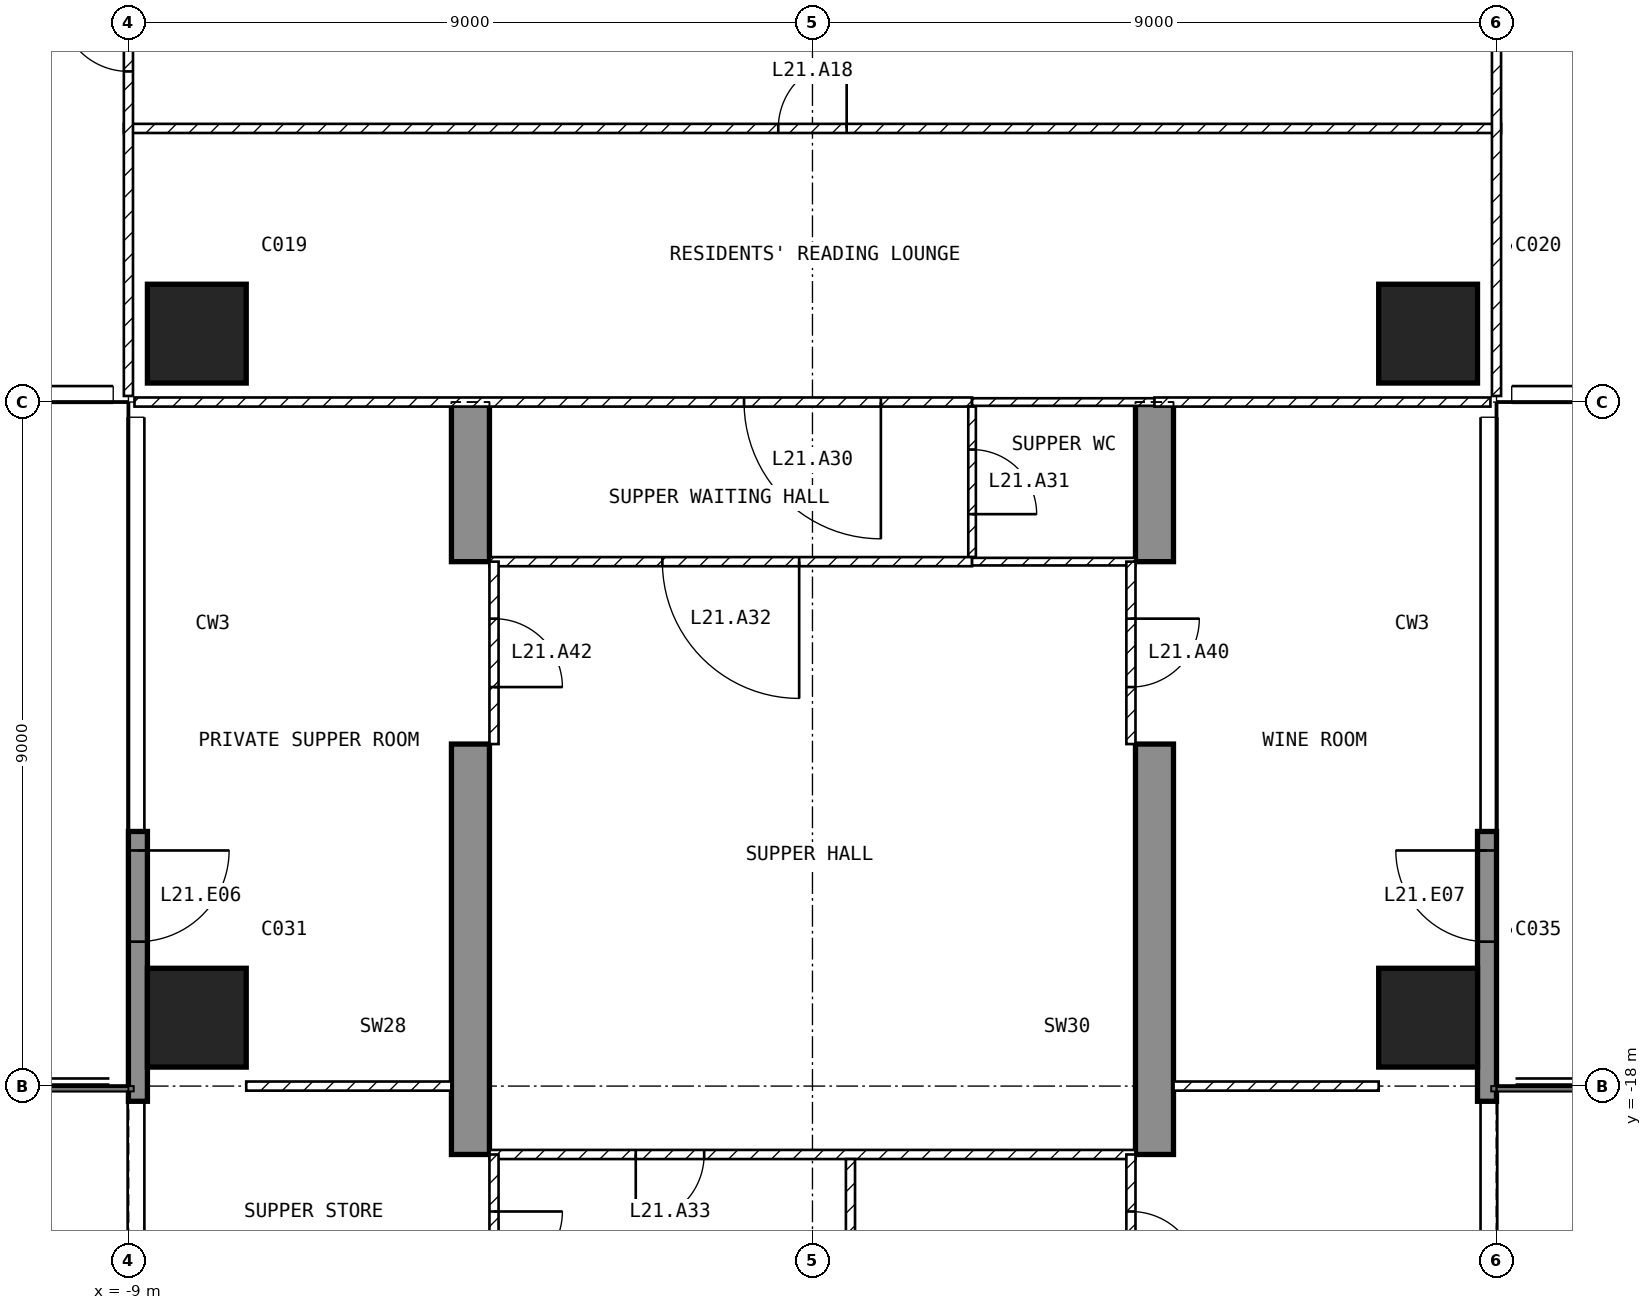
"""IFC4 building model, lengths in metres.
Left out: names, types, materials, properties, quantities, classifications, styles, units other than length and angle.
Written with IfcOpenShell. Run it as: python <this file> out.ifc"""

import sys

from ifc_helpers import new_model, si_unit, direction, frame, frame_2d, origin, origin_2d, place, context, subcontext, project, spatial, polyline, rectangle, outline, extrude, element, fill, save


model = new_model("IFC4")
c1 = context("Model", 3, precision=1e-05, world=origin(), true_north=direction((0.0, 1.0)))
c2 = subcontext(c1, "Body", "Model", "MODEL_VIEW")
j1 = project(units=[si_unit("LENGTHUNIT", "METRE"), si_unit("PLANEANGLEUNIT", "RADIAN")], contexts=[c1])
p1 = place(None, origin())
s1 = spatial("IfcSite", under=j1, at=p1, CompositionType="ELEMENT")
p2 = place(p1, origin())
s2 = spatial("IfcBuilding", under=s1, at=p2, CompositionType="ELEMENT")
p3 = place(p2, frame((0.0, 0.0, 92.5)))
s3 = spatial("IfcBuildingStorey", under=s2, at=p3, CompositionType="ELEMENT", Elevation=92.5)
for number, where, z_axis, x_axis in (
    (1, (-8.1, -17.1, -0.3), (0.0, 0.0, 1.0), (1.0, 0.0, 0.0)),
    (2, (-8.1, -8.1, -0.3), (0.0, 0.0, 1.0), (1.0, 0.0, 0.0)),
    (3, (8.1, -17.1, -0.3), (0.0, 0.0, 1.0), (1.0, 0.0, 0.0)),
    (4, (8.1, -8.1, -0.3), (0.0, 0.0, 1.0), (1.0, 0.0, 0.0)),
):
    element("IfcColumn", number, at=place(p3, frame(where, z_axis=z_axis, x_axis=x_axis)), inside=s3, PredefinedType="COLUMN", context=c2, shape_type="SweptSolid", body=[
        extrude(rectangle(XDim=1.3, YDim=1.3, at=origin_2d()), origin(), (0.0, 0.0, 1.0), 5.25),
    ])
for number, where, z_axis, x_axis in (
    (5, (-4.75, -25.45, -0.3), (1.0, 0.0, 0.0), (0.0, 1.0, 0.0)),
    (6, (4.25, -25.45, -0.3), (1.0, 0.0, 0.0), (0.0, 1.0, 0.0)),
):
    element("IfcWall", number, at=place(p3, frame(where, z_axis=z_axis, x_axis=x_axis)), inside=s3, PredefinedType="SHEAR", context=c2, shape_type="SweptSolid", body=[
        extrude(outline(polyline([(0.0, 0.0), (4.15, 0.0), (4.15, 2.7), (6.55, 2.7), (6.55, 0.0), (11.95, 0.0), (11.95, 2.7), (14.35, 2.7), (14.35, 0.0), (16.45, 0.0), (16.45, 5.25), (0.0, 5.25), (0.0, 0.0)])), origin(), (0.0, 0.0, 1.0), 0.5),
    ])
p4 = place(p3, frame((-8.875, -14.65, 0.0), z_axis=(0.0, 0.0, 1.0), x_axis=(0.0, -1.0, 0.0)))
e7 = element("IfcWall", 7, at=p4, inside=s3, PredefinedType="SOLIDWALL", context=c2, shape_type="SweptSolid", body=[
    extrude(rectangle(XDim=3.55, YDim=0.25, at=frame_2d((1.775, 0.0))), origin(), (0.0, 0.0, 1.0), 4.95),
])
p5 = place(p4, frame((0.25, 0.0, 0.0)))
e8 = element("IfcOpeningElement", 8, at=p5, cuts=e7, PredefinedType="OPENING", context=c2, shape_type="SweptSolid", body=[
    extrude(rectangle(XDim=1.2, YDim=2.4, at=frame_2d((0.6, 1.2))), frame((0.0, 0.135, 0.0), z_axis=(0.0, -1.0, 0.0), x_axis=(1.0, 0.0, 0.0)), (0.0, 0.0, 1.0), 0.27),
])
p6 = place(p3, frame((8.875, -18.2, 0.0), z_axis=(0.0, 0.0, 1.0), x_axis=(0.0, 1.0, 0.0)))
e9 = element("IfcWall", 9, at=p6, inside=s3, PredefinedType="SOLIDWALL", context=c2, shape_type="SweptSolid", body=[
    extrude(rectangle(XDim=3.55, YDim=0.25, at=frame_2d((1.775, 0.0))), origin(), (0.0, 0.0, 1.0), 4.95),
])
p7 = place(p6, frame((2.1, 0.0, 0.0)))
e10 = element("IfcOpeningElement", 10, at=p7, cuts=e9, PredefinedType="OPENING", context=c2, shape_type="SweptSolid", body=[
    extrude(rectangle(XDim=1.2, YDim=2.4, at=frame_2d((0.6, 1.2))), frame((0.0, 0.135, 0.0), z_axis=(0.0, -1.0, 0.0), x_axis=(1.0, 0.0, 0.0)), (0.0, 0.0, 1.0), 0.27),
])
p8 = place(p3, frame((-9.06, -5.4, 0.0), z_axis=(0.0, 0.0, 1.0), x_axis=(1.0, 0.0, 0.0)))
e11 = element("IfcWall", 11, at=p8, inside=s3, PredefinedType="PARTITIONING", context=c2, shape_type="SweptSolid", body=[
    extrude(rectangle(XDim=18.12, YDim=0.12, at=frame_2d((9.06, 0.0))), origin(), (0.0, 0.0, 1.0), 4.95),
])
p9 = place(p8, frame((8.61, 0.0, 0.0)))
e12 = element("IfcOpeningElement", 12, at=p9, cuts=e11, PredefinedType="OPENING", context=c2, shape_type="SweptSolid", body=[
    extrude(rectangle(XDim=0.9, YDim=2.1, at=frame_2d((0.45, 1.05))), frame((0.0, 0.07, 0.0), z_axis=(0.0, -1.0, 0.0), x_axis=(1.0, 0.0, 0.0)), (0.0, 0.0, 1.0), 0.14),
])
p10 = place(p3, frame((9.0, -1.26, 0.0), z_axis=(0.0, 0.0, 1.0), x_axis=(0.0, -1.0, 0.0)))
e13 = element("IfcWall", 13, at=p10, inside=s3, PredefinedType="PARTITIONING", context=c2, shape_type="SweptSolid", body=[
    extrude(rectangle(XDim=7.66, YDim=0.12, at=frame_2d((3.83, 0.0))), origin(), (0.0, 0.0, 1.0), 4.95),
])
p11 = place(p3, frame((-9.0, -8.92, 0.0), z_axis=(0.0, 0.0, 1.0), x_axis=(0.0, 1.0, 0.0)))
e14 = element("IfcWall", 14, at=p11, inside=s3, PredefinedType="PARTITIONING", context=c2, shape_type="SweptSolid", body=[
    extrude(rectangle(XDim=7.66, YDim=0.12, at=frame_2d((3.83, 0.0))), origin(), (0.0, 0.0, 1.0), 4.95),
])
p12 = place(p11, frame((4.27, 0.0, 0.0)))
e15 = element("IfcOpeningElement", 15, at=p12, cuts=e14, PredefinedType="OPENING", context=c2, shape_type="SweptSolid", body=[
    extrude(rectangle(XDim=0.9, YDim=2.1, at=frame_2d((0.45, 1.05))), frame((0.0, 0.07, 0.0), z_axis=(0.0, -1.0, 0.0), x_axis=(1.0, 0.0, 0.0)), (0.0, 0.0, 1.0), 0.14),
])
p13 = place(p11, frame((6.34, 0.0, 0.0)))
e16 = element("IfcOpeningElement", 16, at=p13, cuts=e14, PredefinedType="OPENING", context=c2, shape_type="SweptSolid", body=[
    extrude(rectangle(XDim=0.9, YDim=2.1, at=frame_2d((0.45, 1.05))), frame((0.0, 0.07, 0.0), z_axis=(0.0, -1.0, 0.0), x_axis=(1.0, 0.0, 0.0)), (0.0, 0.0, 1.0), 0.14),
])
p14 = place(p3, frame((2.1, -9.0, 0.0), z_axis=(0.0, 0.0, 1.0), x_axis=(-1.0, 0.0, 0.0)))
e17 = element("IfcWall", 17, at=p14, inside=s3, PredefinedType="PARTITIONING", context=c2, shape_type="SweptSolid", body=[
    extrude(rectangle(XDim=11.02, YDim=0.12, at=frame_2d((5.51, 0.0))), origin(), (0.0, 0.0, 1.0), 4.95),
])
p15 = place(p14, frame((1.2, 0.0, 0.0)))
e18 = element("IfcOpeningElement", 18, at=p15, cuts=e17, PredefinedType="OPENING", context=c2, shape_type="SweptSolid", body=[
    extrude(rectangle(XDim=1.8, YDim=2.1, at=frame_2d((0.9, 1.05))), frame((0.0, 0.07, 0.0), z_axis=(0.0, -1.0, 0.0), x_axis=(1.0, 0.0, 0.0)), (0.0, 0.0, 1.0), 0.14),
])
p16 = place(p3, frame((4.5, -9.0, 0.0), z_axis=(0.0, 0.0, 1.0), x_axis=(-1.0, 0.0, 0.0)))
e19 = element("IfcWall", 19, at=p16, inside=s3, PredefinedType="PARTITIONING", context=c2, shape_type="SweptSolid", body=[
    extrude(rectangle(XDim=2.4, YDim=0.1, at=frame_2d((1.2, 0.0))), origin(), (0.0, 0.0, 1.0), 4.95),
])
p17 = place(p3, frame((8.92, -9.0, 0.0), z_axis=(0.0, 0.0, 1.0), x_axis=(-1.0, 0.0, 0.0)))
e20 = element("IfcWall", 20, at=p17, inside=s3, PredefinedType="PARTITIONING", context=c2, shape_type="SweptSolid", body=[
    extrude(rectangle(XDim=4.42, YDim=0.12, at=frame_2d((2.21, 0.0))), origin(), (0.0, 0.0, 1.0), 4.95),
])
p18 = place(p3, frame((2.1, -9.06, 0.0), z_axis=(0.0, 0.0, 1.0), x_axis=(0.0, -1.0, 0.0)))
e21 = element("IfcWall", 21, at=p18, inside=s3, PredefinedType="PARTITIONING", context=c2, shape_type="SweptSolid", body=[
    extrude(rectangle(XDim=1.98, YDim=0.1, at=frame_2d((0.99, 0.0))), origin(), (0.0, 0.0, 1.0), 4.95),
])
p19 = place(p18, frame((0.565, 0.0, 0.0)))
e22 = element("IfcOpeningElement", 22, at=p19, cuts=e21, PredefinedType="OPENING", context=c2, shape_type="SweptSolid", body=[
    extrude(rectangle(XDim=0.85, YDim=2.1, at=frame_2d((0.425, 1.05))), frame((0.0, 0.06, 0.0), z_axis=(0.0, -1.0, 0.0), x_axis=(1.0, 0.0, 0.0)), (0.0, 0.0, 1.0), 0.12),
])
p20 = place(p3, frame((2.1, -11.1, 0.0), z_axis=(0.0, 0.0, 1.0), x_axis=(-1.0, 0.0, 0.0)))
e23 = element("IfcWall", 23, at=p20, inside=s3, PredefinedType="PARTITIONING", context=c2, shape_type="SweptSolid", body=[
    extrude(rectangle(XDim=6.35, YDim=0.12, at=frame_2d((3.175, 0.0))), origin(), (0.0, 0.0, 1.0), 4.95),
])
p21 = place(p20, frame((2.275, 0.0, 0.0)))
e24 = element("IfcOpeningElement", 24, at=p21, cuts=e23, PredefinedType="OPENING", context=c2, shape_type="SweptSolid", body=[
    extrude(rectangle(XDim=1.8, YDim=2.1, at=frame_2d((0.9, 1.05))), frame((0.0, 0.07, 0.0), z_axis=(0.0, -1.0, 0.0), x_axis=(1.0, 0.0, 0.0)), (0.0, 0.0, 1.0), 0.14),
])
p22 = place(p3, frame((4.25, -11.1, 0.0), z_axis=(0.0, 0.0, 1.0), x_axis=(-1.0, 0.0, 0.0)))
e25 = element("IfcWall", 25, at=p22, inside=s3, PredefinedType="PARTITIONING", context=c2, shape_type="SweptSolid", body=[
    extrude(rectangle(XDim=2.15, YDim=0.1, at=frame_2d((1.075, 0.0))), origin(), (0.0, 0.0, 1.0), 4.95),
])
p23 = place(p3, frame((4.25, -18.9, 0.0), z_axis=(0.0, 0.0, 1.0), x_axis=(-1.0, 0.0, 0.0)))
e26 = element("IfcWall", 26, at=p23, inside=s3, PredefinedType="PARTITIONING", context=c2, shape_type="SweptSolid", body=[
    extrude(rectangle(XDim=8.5, YDim=0.12, at=frame_2d((4.25, 0.0))), origin(), (0.0, 0.0, 1.0), 4.95),
])
p24 = place(p23, frame((5.675, 0.0, 0.0)))
e27 = element("IfcOpeningElement", 27, at=p24, cuts=e26, PredefinedType="OPENING", context=c2, shape_type="SweptSolid", body=[
    extrude(rectangle(XDim=0.9, YDim=2.1, at=frame_2d((0.45, 1.05))), frame((0.0, 0.07, 0.0), z_axis=(0.0, -1.0, 0.0), x_axis=(1.0, 0.0, 0.0)), (0.0, 0.0, 1.0), 0.14),
])
p25 = place(p3, frame((0.5, -18.96, 0.0), z_axis=(0.0, 0.0, 1.0), x_axis=(0.0, -1.0, 0.0)))
e28 = element("IfcWall", 28, at=p25, inside=s3, PredefinedType="PARTITIONING", context=c2, shape_type="SweptSolid", body=[
    extrude(rectangle(XDim=4.38, YDim=0.12, at=frame_2d((2.19, 0.0))), origin(), (0.0, 0.0, 1.0), 4.95),
])
p26 = place(p25, frame((1.74, 0.0, 0.0)))
e29 = element("IfcOpeningElement", 29, at=p26, cuts=e28, PredefinedType="OPENING", context=c2, shape_type="SweptSolid", body=[
    extrude(rectangle(XDim=0.9, YDim=2.1, at=frame_2d((0.45, 1.05))), frame((0.0, 0.07, 0.0), z_axis=(0.0, -1.0, 0.0), x_axis=(1.0, 0.0, 0.0)), (0.0, 0.0, 1.0), 0.14),
])
for number, where, z_axis, x_axis in (
    (30, (7.45, -18.0, 0.0), (0.0, 0.0, 1.0), (-1.0, 0.0, 0.0)),
    (31, (-4.75, -18.0, 0.0), (0.0, 0.0, 1.0), (-1.0, 0.0, 0.0)),
):
    element("IfcWall", number, at=place(p3, frame(where, z_axis=z_axis, x_axis=x_axis)), inside=s3, PredefinedType="PARTITIONING", context=c2, shape_type="SweptSolid", body=[
        extrude(rectangle(XDim=2.7, YDim=0.12, at=frame_2d((1.35, 0.0))), origin(), (0.0, 0.0, 1.0), 4.95),
    ])
p27 = place(p3, frame((4.19, -11.1, 0.0), z_axis=(0.0, 0.0, 1.0), x_axis=(0.0, -1.0, 0.0)))
e32 = element("IfcWall", 32, at=p27, inside=s3, PredefinedType="PARTITIONING", context=c2, shape_type="SweptSolid", body=[
    extrude(rectangle(XDim=2.4, YDim=0.12, at=frame_2d((1.2, 0.0))), origin(), (0.0, 0.0, 1.0), 2.4),
])
p28 = place(p27, frame((0.75, 0.0, 0.0)))
e33 = element("IfcOpeningElement", 33, at=p28, cuts=e32, PredefinedType="OPENING", context=c2, shape_type="SweptSolid", body=[
    extrude(rectangle(XDim=0.9, YDim=2.1, at=frame_2d((0.45, 1.05))), frame((0.0, 0.07, 0.0), z_axis=(0.0, -1.0, 0.0), x_axis=(1.0, 0.0, 0.0)), (0.0, 0.0, 1.0), 0.14),
])
p29 = place(p3, frame((4.19, -18.9, 0.0), z_axis=(0.0, 0.0, 1.0), x_axis=(0.0, -1.0, 0.0)))
e34 = element("IfcWall", 34, at=p29, inside=s3, PredefinedType="PARTITIONING", context=c2, shape_type="SweptSolid", body=[
    extrude(rectangle(XDim=2.4, YDim=0.12, at=frame_2d((1.2, 0.0))), origin(), (0.0, 0.0, 1.0), 2.4),
])
p30 = place(p29, frame((0.75, 0.0, 0.0)))
e35 = element("IfcOpeningElement", 35, at=p30, cuts=e34, PredefinedType="OPENING", context=c2, shape_type="SweptSolid", body=[
    extrude(rectangle(XDim=0.9, YDim=2.1, at=frame_2d((0.45, 1.05))), frame((0.0, 0.07, 0.0), z_axis=(0.0, -1.0, 0.0), x_axis=(1.0, 0.0, 0.0)), (0.0, 0.0, 1.0), 0.14),
])
p31 = place(p3, frame((-4.19, -11.1, 0.0), z_axis=(0.0, 0.0, 1.0), x_axis=(0.0, -1.0, 0.0)))
e36 = element("IfcWall", 36, at=p31, inside=s3, PredefinedType="PARTITIONING", context=c2, shape_type="SweptSolid", body=[
    extrude(rectangle(XDim=2.4, YDim=0.12, at=frame_2d((1.2, 0.0))), origin(), (0.0, 0.0, 1.0), 2.4),
])
p32 = place(p31, frame((0.75, 0.0, 0.0)))
e37 = element("IfcOpeningElement", 37, at=p32, cuts=e36, PredefinedType="OPENING", context=c2, shape_type="SweptSolid", body=[
    extrude(rectangle(XDim=0.9, YDim=2.1, at=frame_2d((0.45, 1.05))), frame((0.0, 0.07, 0.0), z_axis=(0.0, -1.0, 0.0), x_axis=(1.0, 0.0, 0.0)), (0.0, 0.0, 1.0), 0.14),
])
p33 = place(p3, frame((-4.19, -18.9, 0.0), z_axis=(0.0, 0.0, 1.0), x_axis=(0.0, -1.0, 0.0)))
e38 = element("IfcWall", 38, at=p33, inside=s3, PredefinedType="PARTITIONING", context=c2, shape_type="SweptSolid", body=[
    extrude(rectangle(XDim=2.4, YDim=0.12, at=frame_2d((1.2, 0.0))), origin(), (0.0, 0.0, 1.0), 2.4),
])
p34 = place(p33, frame((0.75, 0.0, 0.0)))
e39 = element("IfcOpeningElement", 39, at=p34, cuts=e38, PredefinedType="OPENING", context=c2, shape_type="SweptSolid", body=[
    extrude(rectangle(XDim=0.9, YDim=2.1, at=frame_2d((0.45, 1.05))), frame((0.0, 0.07, 0.0), z_axis=(0.0, -1.0, 0.0), x_axis=(1.0, 0.0, 0.0)), (0.0, 0.0, 1.0), 0.14),
])
p35 = place(p5, origin())
e40 = element("IfcDoor", 40, at=p35, inside=s3, OperationType="SINGLE_SWING_LEFT", PredefinedType="DOOR", context=c2, shape_type="SweptSolid", body=[
    extrude(rectangle(XDim=1.2, YDim=2.4, at=frame_2d((0.6, 1.2))), frame((0.0, 0.025, 0.0), z_axis=(0.0, -1.0, 0.0), x_axis=(1.0, 0.0, 0.0)), (0.0, 0.0, 1.0), 0.05),
])
fill(e8, e40)
p36 = place(p7, origin())
e41 = element("IfcDoor", 41, at=p36, inside=s3, OperationType="SINGLE_SWING_RIGHT", PredefinedType="DOOR", context=c2, shape_type="SweptSolid", body=[
    extrude(rectangle(XDim=1.2, YDim=2.4, at=frame_2d((0.6, 1.2))), frame((0.0, 0.025, 0.0), z_axis=(0.0, -1.0, 0.0), x_axis=(1.0, 0.0, 0.0)), (0.0, 0.0, 1.0), 0.05),
])
fill(e10, e41)
p37 = place(p12, origin())
e42 = element("IfcDoor", 42, at=p37, inside=s3, OperationType="SINGLE_SWING_RIGHT", PredefinedType="DOOR", context=c2, shape_type="SweptSolid", body=[
    extrude(rectangle(XDim=0.9, YDim=2.1, at=frame_2d((0.45, 1.05))), frame((0.0, 0.025, 0.0), z_axis=(0.0, -1.0, 0.0), x_axis=(1.0, 0.0, 0.0)), (0.0, 0.0, 1.0), 0.05),
])
fill(e15, e42)
p38 = place(p9, origin())
e43 = element("IfcDoor", 43, at=p38, inside=s3, OperationType="SINGLE_SWING_RIGHT", PredefinedType="DOOR", context=c2, shape_type="SweptSolid", body=[
    extrude(rectangle(XDim=0.9, YDim=2.1, at=frame_2d((0.45, 1.05))), frame((0.0, 0.025, 0.0), z_axis=(0.0, -1.0, 0.0), x_axis=(1.0, 0.0, 0.0)), (0.0, 0.0, 1.0), 0.05),
])
fill(e12, e43)
p39 = place(p15, origin())
e44 = element("IfcDoor", 44, at=p39, inside=s3, OperationType="SINGLE_SWING_LEFT", PredefinedType="DOOR", context=c2, shape_type="SweptSolid", body=[
    extrude(rectangle(XDim=1.8, YDim=2.1, at=frame_2d((0.9, 1.05))), frame((0.0, 0.025, 0.0), z_axis=(0.0, -1.0, 0.0), x_axis=(1.0, 0.0, 0.0)), (0.0, 0.0, 1.0), 0.05),
])
fill(e18, e44)
p40 = place(p19, origin())
e45 = element("IfcDoor", 45, at=p40, inside=s3, OperationType="SINGLE_SWING_RIGHT", PredefinedType="DOOR", context=c2, shape_type="SweptSolid", body=[
    extrude(rectangle(XDim=0.85, YDim=2.1, at=frame_2d((0.425, 1.05))), frame((0.0, 0.025, 0.0), z_axis=(0.0, -1.0, 0.0), x_axis=(1.0, 0.0, 0.0)), (0.0, 0.0, 1.0), 0.05),
])
fill(e22, e45)
p41 = place(p21, origin())
e46 = element("IfcDoor", 46, at=p41, inside=s3, OperationType="SINGLE_SWING_LEFT", PredefinedType="DOOR", context=c2, shape_type="SweptSolid", body=[
    extrude(rectangle(XDim=1.8, YDim=2.1, at=frame_2d((0.9, 1.05))), frame((0.0, 0.025, 0.0), z_axis=(0.0, -1.0, 0.0), x_axis=(1.0, 0.0, 0.0)), (0.0, 0.0, 1.0), 0.05),
])
fill(e24, e46)
p42 = place(p24, origin())
e47 = element("IfcDoor", 47, at=p42, inside=s3, OperationType="SINGLE_SWING_RIGHT", PredefinedType="DOOR", context=c2, shape_type="SweptSolid", body=[
    extrude(rectangle(XDim=0.9, YDim=2.1, at=frame_2d((0.45, 1.05))), frame((0.0, 0.025, 0.0), z_axis=(0.0, -1.0, 0.0), x_axis=(1.0, 0.0, 0.0)), (0.0, 0.0, 1.0), 0.05),
])
fill(e27, e47)
p43 = place(p28, origin())
e48 = element("IfcDoor", 48, at=p43, inside=s3, OperationType="SINGLE_SWING_LEFT", PredefinedType="DOOR", context=c2, shape_type="SweptSolid", body=[
    extrude(rectangle(XDim=0.9, YDim=2.1, at=frame_2d((0.45, 1.05))), frame((0.0, 0.025, 0.0), z_axis=(0.0, -1.0, 0.0), x_axis=(1.0, 0.0, 0.0)), (0.0, 0.0, 1.0), 0.05),
])
fill(e33, e48)
p44 = place(p30, origin())
e49 = element("IfcDoor", 49, at=p44, inside=s3, OperationType="SINGLE_SWING_RIGHT", PredefinedType="DOOR", context=c2, shape_type="SweptSolid", body=[
    extrude(rectangle(XDim=0.9, YDim=2.1, at=frame_2d((0.45, 1.05))), frame((0.0, 0.025, 0.0), z_axis=(0.0, -1.0, 0.0), x_axis=(1.0, 0.0, 0.0)), (0.0, 0.0, 1.0), 0.05),
])
fill(e35, e49)
p45 = place(p32, origin())
e50 = element("IfcDoor", 50, at=p45, inside=s3, OperationType="SINGLE_SWING_RIGHT", PredefinedType="DOOR", context=c2, shape_type="SweptSolid", body=[
    extrude(rectangle(XDim=0.9, YDim=2.1, at=frame_2d((0.45, 1.05))), frame((0.0, 0.025, 0.0), z_axis=(0.0, -1.0, 0.0), x_axis=(1.0, 0.0, 0.0)), (0.0, 0.0, 1.0), 0.05),
])
fill(e37, e50)
p46 = place(p34, origin())
e51 = element("IfcDoor", 51, at=p46, inside=s3, OperationType="SINGLE_SWING_LEFT", PredefinedType="DOOR", context=c2, shape_type="SweptSolid", body=[
    extrude(rectangle(XDim=0.9, YDim=2.1, at=frame_2d((0.45, 1.05))), frame((0.0, 0.025, 0.0), z_axis=(0.0, -1.0, 0.0), x_axis=(1.0, 0.0, 0.0)), (0.0, 0.0, 1.0), 0.05),
])
fill(e39, e51)
save(model, sys.argv[1])
